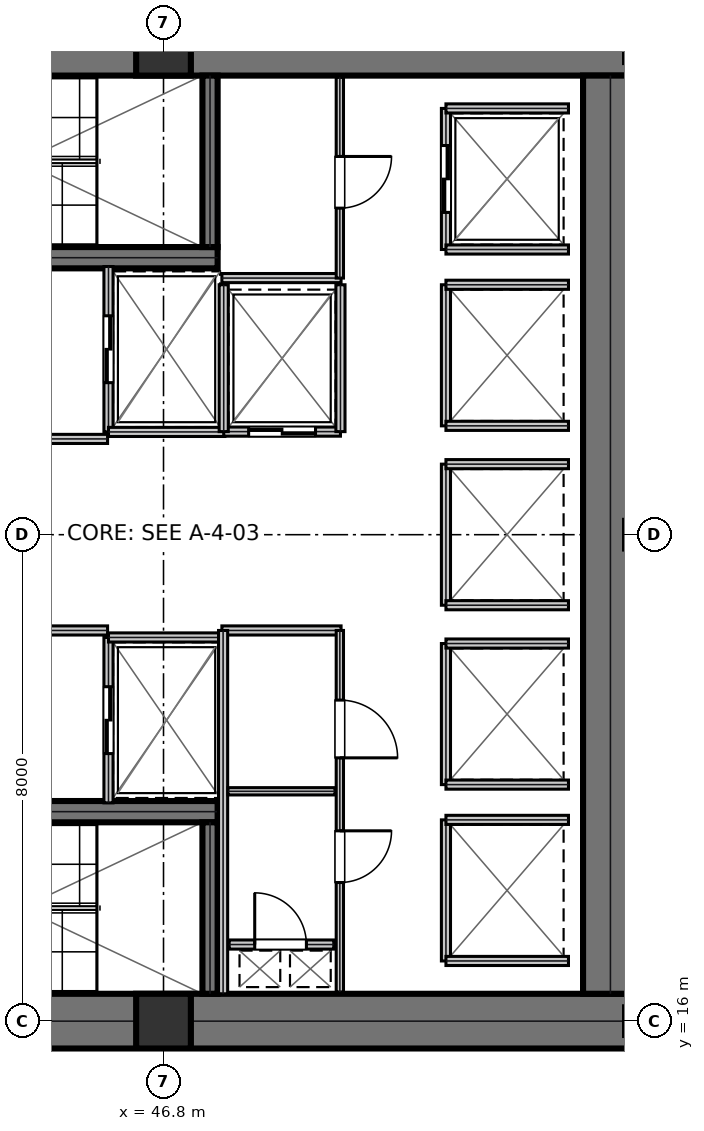
"""IFC4 building model, lengths in metres.
Left out: names, types, materials, properties, quantities, classifications, styles, units other than length and angle.
Written with IfcOpenShell. Run it as: python <this file> out.ifc"""

import sys

from ifc_helpers import new_model, si_unit, direction, frame, frame_2d, origin, origin_2d, place, context, subcontext, project, spatial, rectangle, extrude, element, fill, save


model = new_model("IFC4")
c1 = context("Model", 3, precision=1e-05, world=origin(), true_north=direction((0.0, 1.0)))
c2 = subcontext(c1, "Body", "Model", "MODEL_VIEW")
j1 = project(units=[si_unit("LENGTHUNIT", "METRE"), si_unit("PLANEANGLEUNIT", "RADIAN")], contexts=[c1])
p1 = place(None, origin())
s1 = spatial("IfcSite", under=j1, at=p1, CompositionType="ELEMENT")
p2 = place(p1, origin())
s2 = spatial("IfcBuilding", under=s1, at=p2, CompositionType="ELEMENT")
p3 = place(p2, frame((0.0, 0.0, 21.6)))
s3 = spatial("IfcBuildingStorey", under=s2, at=p3, CompositionType="ELEMENT", Elevation=21.6)
for number, where, z_axis, x_axis in (
    (1, (38.8, 32.0, 0.0), (0.0, 0.0, 1.0), (1.0, 0.0, 0.0)),
    (2, (38.8, 16.0, 0.0), (0.0, 0.0, 1.0), (1.0, 0.0, 0.0)),
):
    element("IfcWall", number, at=place(p3, frame(where, z_axis=z_axis, x_axis=x_axis)), inside=s3, PredefinedType="SHEAR", context=c2, shape_type="SweptSolid", body=[
        extrude(rectangle(XDim=16.0, YDim=0.9, at=frame_2d((8.0, 0.0))), origin(), (0.0, 0.0, 1.0), 5.08),
    ])
p4 = place(p3, frame((54.15, 16.45, 0.0), z_axis=(0.0, 0.0, 1.0), x_axis=(0.0, 1.0, 0.0)))
e3 = element("IfcWall", 3, at=p4, inside=s3, PredefinedType="SHEAR", context=c2, shape_type="SweptSolid", body=[
    extrude(rectangle(XDim=15.1, YDim=0.9, at=frame_2d((7.55, 0.0))), origin(), (0.0, 0.0, 1.0), 5.08),
])
p5 = place(p3, frame((39.98, 28.555, 0.0), z_axis=(0.0, 0.0, 1.0), x_axis=(1.0, 0.0, 0.0)))
e4 = element("IfcWall", 4, at=p5, inside=s3, PredefinedType="SHEAR", context=c2, shape_type="SweptSolid", body=[
    extrude(rectangle(XDim=7.71, YDim=0.35, at=frame_2d((3.855, 0.0))), origin(), (0.0, 0.0, 1.0), 5.08),
])
p6 = place(p5, frame((0.25, 0.0, 0.0)))
e5 = element("IfcOpeningElement", 5, at=p6, cuts=e4, PredefinedType="OPENING", context=c2, shape_type="SweptSolid", body=[
    extrude(rectangle(XDim=1.1, YDim=2.15, at=frame_2d((0.55, 1.075))), frame((0.0, 0.185, 0.0), z_axis=(0.0, -1.0, 0.0), x_axis=(1.0, 0.0, 0.0)), (0.0, 0.0, 1.0), 0.37),
])
p7 = place(p3, frame((39.98, 19.445, 0.0), z_axis=(0.0, 0.0, 1.0), x_axis=(1.0, 0.0, 0.0)))
e6 = element("IfcWall", 6, at=p7, inside=s3, PredefinedType="SHEAR", context=c2, shape_type="SweptSolid", body=[
    extrude(rectangle(XDim=7.71, YDim=0.35, at=frame_2d((3.855, 0.0))), origin(), (0.0, 0.0, 1.0), 5.08),
])
p8 = place(p7, frame((0.25, 0.0, 0.0)))
e7 = element("IfcOpeningElement", 7, at=p8, cuts=e6, PredefinedType="OPENING", context=c2, shape_type="SweptSolid", body=[
    extrude(rectangle(XDim=1.1, YDim=2.15, at=frame_2d((0.55, 1.075))), frame((0.0, 0.185, 0.0), z_axis=(0.0, -1.0, 0.0), x_axis=(1.0, 0.0, 0.0)), (0.0, 0.0, 1.0), 0.37),
])
for number, where, z_axis, x_axis in (
    (8, (47.565, 28.73, 0.0), (0.0, 0.0, 1.0), (0.0, 1.0, 0.0)),
    (9, (47.565, 16.45, 0.0), (0.0, 0.0, 1.0), (0.0, 1.0, 0.0)),
):
    element("IfcWall", number, at=place(p3, frame(where, z_axis=z_axis, x_axis=x_axis)), inside=s3, PredefinedType="SHEAR", context=c2, shape_type="SweptSolid", body=[
        extrude(rectangle(XDim=2.82, YDim=0.25, at=frame_2d((1.41, 0.0))), origin(), (0.0, 0.0, 1.0), 5.08),
    ])
for number, where, z_axis, x_axis in (
    (10, (46.8, 16.0, 0.0), (0.0, 0.0, 1.0), (1.0, 0.0, 0.0)),
    (11, (46.8, 32.0, 0.0), (0.0, 0.0, 1.0), (1.0, 0.0, 0.0)),
):
    element("IfcColumn", number, at=place(p3, frame(where, z_axis=z_axis, x_axis=x_axis)), inside=s3, PredefinedType="COLUMN", context=c2, shape_type="SweptSolid", body=[
        extrude(rectangle(XDim=0.9, YDim=0.9, at=origin_2d()), origin(), (0.0, 0.0, 1.0), 5.395),
    ])
p9 = place(p3, frame((39.98, 25.575, 0.0), z_axis=(0.0, 0.0, 1.0), x_axis=(1.0, 0.0, 0.0)))
e12 = element("IfcWall", 12, at=p9, inside=s3, PredefinedType="PARTITIONING", context=c2, shape_type="SweptSolid", body=[
    extrude(rectangle(XDim=5.9, YDim=0.15, at=frame_2d((2.95, 0.0))), origin(), (0.0, 0.0, 1.0), 5.08),
])
p10 = place(p9, frame((2.35, 0.0, 0.0)))
e13 = element("IfcOpeningElement", 13, at=p10, cuts=e12, PredefinedType="OPENING", context=c2, shape_type="SweptSolid", body=[
    extrude(rectangle(XDim=1.05, YDim=2.15, at=frame_2d((0.525, 1.075))), frame((0.0, 0.085, 0.0), z_axis=(0.0, -1.0, 0.0), x_axis=(1.0, 0.0, 0.0)), (0.0, 0.0, 1.0), 0.17),
])
p11 = place(p3, frame((39.98, 22.425, 0.0), z_axis=(0.0, 0.0, 1.0), x_axis=(1.0, 0.0, 0.0)))
e14 = element("IfcWall", 14, at=p11, inside=s3, PredefinedType="PARTITIONING", context=c2, shape_type="SweptSolid", body=[
    extrude(rectangle(XDim=5.9, YDim=0.15, at=frame_2d((2.95, 0.0))), origin(), (0.0, 0.0, 1.0), 5.08),
])
p12 = place(p11, frame((2.35, 0.0, 0.0)))
e15 = element("IfcOpeningElement", 15, at=p12, cuts=e14, PredefinedType="OPENING", context=c2, shape_type="SweptSolid", body=[
    extrude(rectangle(XDim=1.05, YDim=2.15, at=frame_2d((0.525, 1.075))), frame((0.0, 0.085, 0.0), z_axis=(0.0, -1.0, 0.0), x_axis=(1.0, 0.0, 0.0)), (0.0, 0.0, 1.0), 0.17),
])
p13 = place(p3, frame((45.895, 25.69, 0.0), z_axis=(0.0, 0.0, 1.0), x_axis=(0.0, 1.0, 0.0)))
e16 = element("IfcWall", 16, at=p13, inside=s3, PredefinedType="PARTITIONING", context=c2, shape_type="SweptSolid", body=[
    extrude(rectangle(XDim=2.72, YDim=0.15, at=frame_2d((1.36, 0.0))), origin(), (0.0, 0.0, 1.0), 5.08),
])
p14 = place(p13, frame((0.81, 0.0, 0.0)))
e17 = element("IfcOpeningElement", 17, at=p14, cuts=e16, PredefinedType="OPENING", context=c2, shape_type="SweptSolid", body=[
    extrude(rectangle(XDim=1.1, YDim=2.15, at=frame_2d((0.55, 1.075))), frame((0.0, 0.085, 0.0), z_axis=(0.0, -1.0, 0.0), x_axis=(1.0, 0.0, 0.0)), (0.0, 0.0, 1.0), 0.17),
])
p15 = place(p3, frame((45.895, 25.69, 0.0), z_axis=(0.0, 0.0, 1.0), x_axis=(1.0, 0.0, 0.0)))
e18 = element("IfcWall", 18, at=p15, inside=s3, PredefinedType="PARTITIONING", context=c2, shape_type="SweptSolid", body=[
    extrude(rectangle(XDim=1.915, YDim=0.15, at=frame_2d((0.958, 0.0))), origin(), (0.0, 0.0, 1.0), 5.08),
])
p16 = place(p3, frame((45.895, 19.59, 0.0), z_axis=(0.0, 0.0, 1.0), x_axis=(0.0, 1.0, 0.0)))
e19 = element("IfcWall", 19, at=p16, inside=s3, PredefinedType="PARTITIONING", context=c2, shape_type="SweptSolid", body=[
    extrude(rectangle(XDim=2.72, YDim=0.15, at=frame_2d((1.36, 0.0))), origin(), (0.0, 0.0, 1.0), 5.08),
])
p17 = place(p16, frame((0.81, 0.0, 0.0)))
e20 = element("IfcOpeningElement", 20, at=p17, cuts=e19, PredefinedType="OPENING", context=c2, shape_type="SweptSolid", body=[
    extrude(rectangle(XDim=1.1, YDim=2.15, at=frame_2d((0.55, 1.075))), frame((0.0, 0.085, 0.0), z_axis=(0.0, -1.0, 0.0), x_axis=(1.0, 0.0, 0.0)), (0.0, 0.0, 1.0), 0.17),
])
p18 = place(p3, frame((45.895, 22.31, 0.0), z_axis=(0.0, 0.0, 1.0), x_axis=(1.0, 0.0, 0.0)))
e21 = element("IfcWall", 21, at=p18, inside=s3, PredefinedType="PARTITIONING", context=c2, shape_type="SweptSolid", body=[
    extrude(rectangle(XDim=1.915, YDim=0.15, at=frame_2d((0.958, 0.0))), origin(), (0.0, 0.0, 1.0), 5.08),
])
p19 = place(p3, frame((47.79, 25.695, 0.0), z_axis=(0.0, 0.0, 1.0), x_axis=(1.0, 0.0, 0.0)))
e22 = element("IfcWall", 22, at=p19, inside=s3, PredefinedType="PARTITIONING", context=c2, shape_type="SweptSolid", body=[
    extrude(rectangle(XDim=1.92, YDim=0.15, at=frame_2d((0.96, 0.0))), origin(), (0.0, 0.0, 1.0), 5.08),
])
p20 = place(p19, frame((0.41, 0.0, 0.0)))
e23 = element("IfcOpeningElement", 23, at=p20, cuts=e22, PredefinedType="OPENING", context=c2, shape_type="SweptSolid", body=[
    extrude(rectangle(XDim=1.1, YDim=2.15, at=frame_2d((0.55, 1.075))), frame((0.0, 0.085, 0.0), z_axis=(0.0, -1.0, 0.0), x_axis=(1.0, 0.0, 0.0)), (0.0, 0.0, 1.0), 0.17),
])
for number, where, z_axis, x_axis in (
    (24, (47.79, 25.695, 0.0), (0.0, 0.0, 1.0), (0.0, 1.0, 0.0)),
    (25, (49.71, 25.695, 0.0), (0.0, 0.0, 1.0), (0.0, 1.0, 0.0)),
):
    element("IfcWall", number, at=place(p3, frame(where, z_axis=z_axis, x_axis=x_axis)), inside=s3, PredefinedType="PARTITIONING", context=c2, shape_type="SweptSolid", body=[
        extrude(rectangle(XDim=2.415, YDim=0.15, at=frame_2d((1.208, 0.0))), origin(), (0.0, 0.0, 1.0), 5.08),
    ])
p21 = place(p3, frame((51.445, 28.69, 0.0), z_axis=(0.0, 0.0, 1.0), x_axis=(0.0, 1.0, 0.0)))
e26 = element("IfcWall", 26, at=p21, inside=s3, PredefinedType="PARTITIONING", context=c2, shape_type="SweptSolid", body=[
    extrude(rectangle(XDim=2.32, YDim=0.15, at=frame_2d((1.16, 0.0))), origin(), (0.0, 0.0, 1.0), 5.08),
])
p22 = place(p21, frame((0.61, 0.0, 0.0)))
e27 = element("IfcOpeningElement", 27, at=p22, cuts=e26, PredefinedType="OPENING", context=c2, shape_type="SweptSolid", body=[
    extrude(rectangle(XDim=1.1, YDim=2.15, at=frame_2d((0.55, 1.075))), frame((0.0, 0.085, 0.0), z_axis=(0.0, -1.0, 0.0), x_axis=(1.0, 0.0, 0.0)), (0.0, 0.0, 1.0), 0.17),
])
for number, where, z_axis, x_axis in (
    (28, (51.445, 28.69, 0.0), (0.0, 0.0, 1.0), (1.0, 0.0, 0.0)),
    (29, (51.445, 31.01, 0.0), (0.0, 0.0, 1.0), (1.0, 0.0, 0.0)),
):
    element("IfcWall", number, at=place(p3, frame(where, z_axis=z_axis, x_axis=x_axis)), inside=s3, PredefinedType="PARTITIONING", context=c2, shape_type="SweptSolid", body=[
        extrude(rectangle(XDim=2.015, YDim=0.15, at=frame_2d((1.007, 0.0))), origin(), (0.0, 0.0, 1.0), 5.08),
    ])
p23 = place(p3, frame((51.445, 25.79, 0.0), z_axis=(0.0, 0.0, 1.0), x_axis=(0.0, 1.0, 0.0)))
e30 = element("IfcWall", 30, at=p23, inside=s3, PredefinedType="PARTITIONING", context=c2, shape_type="SweptSolid", body=[
    extrude(rectangle(XDim=2.32, YDim=0.15, at=frame_2d((1.16, 0.0))), origin(), (0.0, 0.0, 1.0), 5.08),
])
for number, where, z_axis, x_axis in (
    (31, (51.445, 25.79, 0.0), (0.0, 0.0, 1.0), (1.0, 0.0, 0.0)),
    (32, (51.445, 28.11, 0.0), (0.0, 0.0, 1.0), (1.0, 0.0, 0.0)),
):
    element("IfcWall", number, at=place(p3, frame(where, z_axis=z_axis, x_axis=x_axis)), inside=s3, PredefinedType="PARTITIONING", context=c2, shape_type="SweptSolid", body=[
        extrude(rectangle(XDim=2.015, YDim=0.15, at=frame_2d((1.007, 0.0))), origin(), (0.0, 0.0, 1.0), 5.08),
    ])
p24 = place(p3, frame((51.445, 19.89, 0.0), z_axis=(0.0, 0.0, 1.0), x_axis=(0.0, 1.0, 0.0)))
e33 = element("IfcWall", 33, at=p24, inside=s3, PredefinedType="PARTITIONING", context=c2, shape_type="SweptSolid", body=[
    extrude(rectangle(XDim=2.32, YDim=0.15, at=frame_2d((1.16, 0.0))), origin(), (0.0, 0.0, 1.0), 5.08),
])
for number, where, z_axis, x_axis in (
    (34, (51.445, 19.89, 0.0), (0.0, 0.0, 1.0), (1.0, 0.0, 0.0)),
    (35, (51.445, 22.21, 0.0), (0.0, 0.0, 1.0), (1.0, 0.0, 0.0)),
):
    element("IfcWall", number, at=place(p3, frame(where, z_axis=z_axis, x_axis=x_axis)), inside=s3, PredefinedType="PARTITIONING", context=c2, shape_type="SweptSolid", body=[
        extrude(rectangle(XDim=2.015, YDim=0.15, at=frame_2d((1.007, 0.0))), origin(), (0.0, 0.0, 1.0), 5.08),
    ])
p25 = place(p3, frame((51.445, 22.84, 0.0), z_axis=(0.0, 0.0, 1.0), x_axis=(0.0, 1.0, 0.0)))
e36 = element("IfcWall", 36, at=p25, inside=s3, PredefinedType="PARTITIONING", context=c2, shape_type="SweptSolid", body=[
    extrude(rectangle(XDim=2.32, YDim=0.15, at=frame_2d((1.16, 0.0))), origin(), (0.0, 0.0, 1.0), 5.08),
])
for number, where, z_axis, x_axis in (
    (37, (51.445, 22.84, 0.0), (0.0, 0.0, 1.0), (1.0, 0.0, 0.0)),
    (38, (51.445, 25.16, 0.0), (0.0, 0.0, 1.0), (1.0, 0.0, 0.0)),
):
    element("IfcWall", number, at=place(p3, frame(where, z_axis=z_axis, x_axis=x_axis)), inside=s3, PredefinedType="PARTITIONING", context=c2, shape_type="SweptSolid", body=[
        extrude(rectangle(XDim=2.015, YDim=0.15, at=frame_2d((1.007, 0.0))), origin(), (0.0, 0.0, 1.0), 5.08),
    ])
p26 = place(p3, frame((51.445, 16.99, 0.0), z_axis=(0.0, 0.0, 1.0), x_axis=(0.0, 1.0, 0.0)))
e39 = element("IfcWall", 39, at=p26, inside=s3, PredefinedType="PARTITIONING", context=c2, shape_type="SweptSolid", body=[
    extrude(rectangle(XDim=2.32, YDim=0.15, at=frame_2d((1.16, 0.0))), origin(), (0.0, 0.0, 1.0), 5.08),
])
for number, where, z_axis, x_axis in (
    (40, (51.445, 16.99, 0.0), (0.0, 0.0, 1.0), (1.0, 0.0, 0.0)),
    (41, (51.445, 19.31, 0.0), (0.0, 0.0, 1.0), (1.0, 0.0, 0.0)),
):
    element("IfcWall", number, at=place(p3, frame(where, z_axis=z_axis, x_axis=x_axis)), inside=s3, PredefinedType="PARTITIONING", context=c2, shape_type="SweptSolid", body=[
        extrude(rectangle(XDim=2.015, YDim=0.15, at=frame_2d((1.007, 0.0))), origin(), (0.0, 0.0, 1.0), 5.08),
    ])
p27 = place(p3, frame((47.88, 17.26, 0.0), z_axis=(0.0, 0.0, 1.0), x_axis=(1.0, 0.0, 0.0)))
e42 = element("IfcWall", 42, at=p27, inside=s3, PredefinedType="PARTITIONING", context=c2, shape_type="SweptSolid", body=[
    extrude(rectangle(XDim=1.72, YDim=0.15, at=frame_2d((0.86, 0.0))), origin(), (0.0, 0.0, 1.0), 5.08),
])
p28 = place(p27, frame((0.42, 0.0, 0.0)))
e43 = element("IfcOpeningElement", 43, at=p28, cuts=e42, PredefinedType="OPENING", context=c2, shape_type="SweptSolid", body=[
    extrude(rectangle(XDim=0.85, YDim=2.15, at=frame_2d((0.425, 1.075))), frame((0.0, 0.085, 0.0), z_axis=(0.0, -1.0, 0.0), x_axis=(1.0, 0.0, 0.0)), (0.0, 0.0, 1.0), 0.17),
])
p29 = place(p3, frame((47.76, 22.425, 0.0), z_axis=(0.0, 0.0, 1.0), x_axis=(1.0, 0.0, 0.0)))
e44 = element("IfcWall", 44, at=p29, inside=s3, PredefinedType="PARTITIONING", context=c2, shape_type="SweptSolid", body=[
    extrude(rectangle(XDim=1.96, YDim=0.15, at=frame_2d((0.98, 0.0))), origin(), (0.0, 0.0, 1.0), 5.08),
])
p30 = place(p3, frame((47.78, 16.45, 0.0), z_axis=(0.0, 0.0, 1.0), x_axis=(0.0, 1.0, 0.0)))
e45 = element("IfcWall", 45, at=p30, inside=s3, PredefinedType="PARTITIONING", context=c2, shape_type="SweptSolid", body=[
    extrude(rectangle(XDim=5.975, YDim=0.15, at=frame_2d((2.988, 0.0))), origin(), (0.0, 0.0, 1.0), 5.08),
])
p31 = place(p3, frame((47.86, 19.78, 0.0), z_axis=(0.0, 0.0, 1.0), x_axis=(1.0, 0.0, 0.0)))
e46 = element("IfcWall", 46, at=p31, inside=s3, PredefinedType="PARTITIONING", context=c2, shape_type="SweptSolid", body=[
    extrude(rectangle(XDim=1.76, YDim=0.12, at=frame_2d((0.88, 0.0))), origin(), (0.0, 0.0, 1.0), 5.08),
])
p32 = place(p3, frame((49.7, 16.48, 0.0), z_axis=(0.0, 0.0, 1.0), x_axis=(0.0, 1.0, 0.0)))
e47 = element("IfcWall", 47, at=p32, inside=s3, PredefinedType="PARTITIONING", context=c2, shape_type="SweptSolid", body=[
    extrude(rectangle(XDim=5.945, YDim=0.12, at=frame_2d((2.973, 0.0))), origin(), (0.0, 0.0, 1.0), 5.08),
])
p33 = place(p32, frame((1.8, 0.0, 0.0)))
e48 = element("IfcOpeningElement", 48, at=p33, cuts=e47, PredefinedType="OPENING", context=c2, shape_type="SweptSolid", body=[
    extrude(rectangle(XDim=0.85, YDim=2.15, at=frame_2d((0.425, 1.075))), frame((0.0, 0.07, 0.0), z_axis=(0.0, -1.0, 0.0), x_axis=(1.0, 0.0, 0.0)), (0.0, 0.0, 1.0), 0.14),
])
p34 = place(p32, frame((3.85, 0.0, 0.0)))
e49 = element("IfcOpeningElement", 49, at=p34, cuts=e47, PredefinedType="OPENING", context=c2, shape_type="SweptSolid", body=[
    extrude(rectangle(XDim=0.95, YDim=2.15, at=frame_2d((0.475, 1.075))), frame((0.0, 0.07, 0.0), z_axis=(0.0, -1.0, 0.0), x_axis=(1.0, 0.0, 0.0)), (0.0, 0.0, 1.0), 0.14),
])
p35 = place(p3, frame((47.76, 28.22, 0.0), z_axis=(0.0, 0.0, 1.0), x_axis=(1.0, 0.0, 0.0)))
e50 = element("IfcWall", 50, at=p35, inside=s3, PredefinedType="PARTITIONING", context=c2, shape_type="SweptSolid", body=[
    extrude(rectangle(XDim=1.96, YDim=0.15, at=frame_2d((0.98, 0.0))), origin(), (0.0, 0.0, 1.0), 5.08),
])
p36 = place(p3, frame((49.7, 28.22, 0.0), z_axis=(0.0, 0.0, 1.0), x_axis=(0.0, 1.0, 0.0)))
e51 = element("IfcWall", 51, at=p36, inside=s3, PredefinedType="PARTITIONING", context=c2, shape_type="SweptSolid", body=[
    extrude(rectangle(XDim=3.3, YDim=0.12, at=frame_2d((1.65, 0.0))), origin(), (0.0, 0.0, 1.0), 5.08),
])
p37 = place(p36, frame((1.15, 0.0, 0.0)))
e52 = element("IfcOpeningElement", 52, at=p37, cuts=e51, PredefinedType="OPENING", context=c2, shape_type="SweptSolid", body=[
    extrude(rectangle(XDim=0.85, YDim=2.15, at=frame_2d((0.425, 1.075))), frame((0.0, 0.07, 0.0), z_axis=(0.0, -1.0, 0.0), x_axis=(1.0, 0.0, 0.0)), (0.0, 0.0, 1.0), 0.14),
])
p38 = place(p3, frame((46.8, 14.5, 0.0), z_axis=(0.0, 0.0, 1.0), x_axis=(0.0, 1.0, 0.0)))
e53 = element("IfcWall", 53, at=p38, inside=s3, PredefinedType="PARTITIONING", context=c2, shape_type="SweptSolid", body=[
    extrude(rectangle(XDim=1.1, YDim=0.12, at=frame_2d((0.55, 0.0))), origin(), (0.0, 0.0, 1.0), 4.375),
])
p39 = place(p14, frame((1.1, 0.0, 0.0), z_axis=(0.0, 0.0, 1.0), x_axis=(-1.0, 0.0, 0.0)))
e54 = element("IfcDoor", 54, at=p39, inside=s3, OperationType="DOUBLE_DOOR_SLIDING", PredefinedType="DOOR", context=c2, shape_type="SweptSolid", body=[
    extrude(rectangle(XDim=1.1, YDim=2.15, at=frame_2d((0.55, 1.075))), frame((0.0, 0.025, 0.0), z_axis=(0.0, -1.0, 0.0), x_axis=(1.0, 0.0, 0.0)), (0.0, 0.0, 1.0), 0.05),
])
fill(e17, e54)
p40 = place(p17, frame((1.1, 0.0, 0.0), z_axis=(0.0, 0.0, 1.0), x_axis=(-1.0, 0.0, 0.0)))
e55 = element("IfcDoor", 55, at=p40, inside=s3, OperationType="DOUBLE_DOOR_SLIDING", PredefinedType="DOOR", context=c2, shape_type="SweptSolid", body=[
    extrude(rectangle(XDim=1.1, YDim=2.15, at=frame_2d((0.55, 1.075))), frame((0.0, 0.025, 0.0), z_axis=(0.0, -1.0, 0.0), x_axis=(1.0, 0.0, 0.0)), (0.0, 0.0, 1.0), 0.05),
])
fill(e20, e55)
p41 = place(p20, frame((1.1, 0.0, 0.0), z_axis=(0.0, 0.0, 1.0), x_axis=(-1.0, 0.0, 0.0)))
e56 = element("IfcDoor", 56, at=p41, inside=s3, OperationType="DOUBLE_DOOR_SLIDING", PredefinedType="DOOR", context=c2, shape_type="SweptSolid", body=[
    extrude(rectangle(XDim=1.1, YDim=2.15, at=frame_2d((0.55, 1.075))), frame((0.0, 0.025, 0.0), z_axis=(0.0, -1.0, 0.0), x_axis=(1.0, 0.0, 0.0)), (0.0, 0.0, 1.0), 0.05),
])
fill(e23, e56)
p42 = place(p22, frame((1.1, 0.0, 0.0), z_axis=(0.0, 0.0, 1.0), x_axis=(-1.0, 0.0, 0.0)))
e57 = element("IfcDoor", 57, at=p42, inside=s3, OperationType="DOUBLE_DOOR_SLIDING", PredefinedType="DOOR", context=c2, shape_type="SweptSolid", body=[
    extrude(rectangle(XDim=1.1, YDim=2.15, at=frame_2d((0.55, 1.075))), frame((0.0, 0.025, 0.0), z_axis=(0.0, -1.0, 0.0), x_axis=(1.0, 0.0, 0.0)), (0.0, 0.0, 1.0), 0.05),
])
fill(e27, e57)
p43 = place(p28, origin())
e58 = element("IfcDoor", 58, at=p43, inside=s3, OperationType="SINGLE_SWING_LEFT", PredefinedType="TRAPDOOR", context=c2, shape_type="SweptSolid", body=[
    extrude(rectangle(XDim=0.85, YDim=2.15, at=frame_2d((0.425, 1.075))), frame((0.0, 0.025, 0.0), z_axis=(0.0, -1.0, 0.0), x_axis=(1.0, 0.0, 0.0)), (0.0, 0.0, 1.0), 0.05),
])
fill(e43, e58)
p44 = place(p33, frame((0.85, 0.0, 0.0), z_axis=(0.0, 0.0, 1.0), x_axis=(-1.0, 0.0, 0.0)))
e59 = element("IfcDoor", 59, at=p44, inside=s3, OperationType="SINGLE_SWING_LEFT", PredefinedType="DOOR", context=c2, shape_type="SweptSolid", body=[
    extrude(rectangle(XDim=0.85, YDim=2.15, at=frame_2d((0.425, 1.075))), frame((0.0, 0.025, 0.0), z_axis=(0.0, -1.0, 0.0), x_axis=(1.0, 0.0, 0.0)), (0.0, 0.0, 1.0), 0.05),
])
fill(e48, e59)
p45 = place(p34, frame((0.95, 0.0, 0.0), z_axis=(0.0, 0.0, 1.0), x_axis=(-1.0, 0.0, 0.0)))
e60 = element("IfcDoor", 60, at=p45, inside=s3, OperationType="SINGLE_SWING_RIGHT", PredefinedType="DOOR", context=c2, shape_type="SweptSolid", body=[
    extrude(rectangle(XDim=0.95, YDim=2.15, at=frame_2d((0.475, 1.075))), frame((0.0, 0.025, 0.0), z_axis=(0.0, -1.0, 0.0), x_axis=(1.0, 0.0, 0.0)), (0.0, 0.0, 1.0), 0.05),
])
fill(e49, e60)
p46 = place(p37, frame((0.85, 0.0, 0.0), z_axis=(0.0, 0.0, 1.0), x_axis=(-1.0, 0.0, 0.0)))
e61 = element("IfcDoor", 61, at=p46, inside=s3, OperationType="SINGLE_SWING_LEFT", PredefinedType="DOOR", context=c2, shape_type="SweptSolid", body=[
    extrude(rectangle(XDim=0.85, YDim=2.15, at=frame_2d((0.425, 1.075))), frame((0.0, 0.025, 0.0), z_axis=(0.0, -1.0, 0.0), x_axis=(1.0, 0.0, 0.0)), (0.0, 0.0, 1.0), 0.05),
])
fill(e52, e61)
save(model, sys.argv[1])
